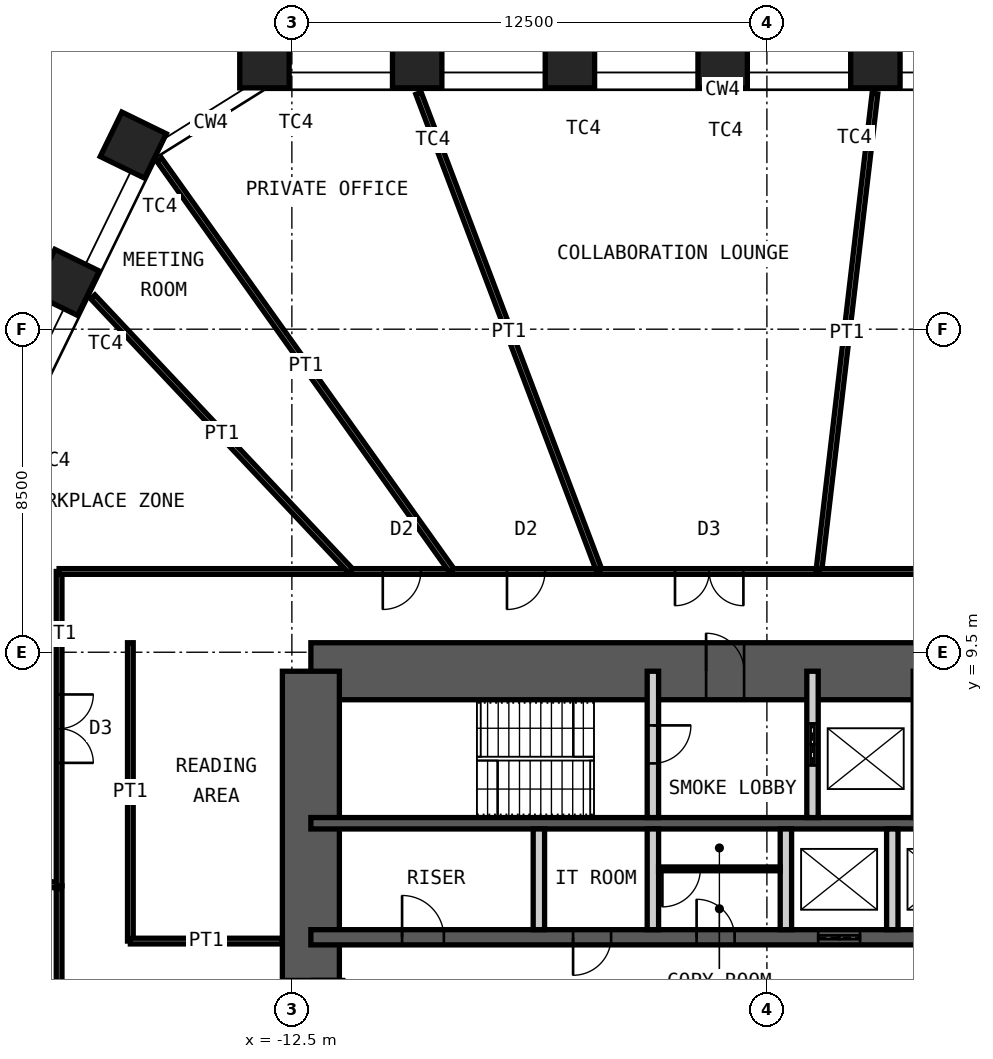
"""IFC4 building model, lengths in metres.
Left out: names, types, materials, properties, quantities, classifications, styles, units other than length and angle.
Written with IfcOpenShell. Run it as: python <this file> out.ifc"""

import sys

from ifc_helpers import new_model, si_unit, direction, frame, frame_2d, origin, origin_2d, place, context, subcontext, project, spatial, rectangle, hollow_rectangle, extrude, element, fill, save


model = new_model("IFC4")
c1 = context("Model", 3, precision=1e-05, world=origin(), true_north=direction((0.0, 1.0)))
c2 = subcontext(c1, "Body", "Model", "MODEL_VIEW")
j1 = project(units=[si_unit("LENGTHUNIT", "METRE"), si_unit("PLANEANGLEUNIT", "RADIAN")], contexts=[c1])
p1 = place(None, origin())
s1 = spatial("IfcSite", under=j1, at=p1, CompositionType="ELEMENT")
p2 = place(p1, origin())
s2 = spatial("IfcBuilding", under=s1, at=p2, CompositionType="ELEMENT")
p3 = place(p2, frame((0.0, 0.0, 157.6)))
s3 = spatial("IfcBuildingStorey", under=s2, at=p3, CompositionType="ELEMENT", Elevation=157.6)
for number, where, z_axis, x_axis in (
    (1, (-13.222, 25.0, 0.0), (0.0, 0.0, 1.0), (-1.0, 0.0, 0.0)),
    (2, (-9.203, 25.0, 0.0), (0.0, 0.0, 1.0), (-1.0, 0.0, 0.0)),
    (3, (-5.184, 25.0, 0.0), (0.0, 0.0, 1.0), (-1.0, 0.0, 0.0)),
    (4, (-1.165, 25.0, 0.0), (0.0, 0.0, 1.0), (-1.0, 0.0, 0.0)),
    (5, (2.854, 25.0, 0.0), (0.0, 0.0, 1.0), (-1.0, 0.0, 0.0)),
    (6, (-18.436, 19.23, 0.0), (0.0, 0.0, 1.0), (-0.438, -0.899, 0.0)),
    (7, (-16.674, 22.843, 0.0), (0.0, 0.0, 1.0), (-0.438, -0.899, 0.0)),
):
    element("IfcColumn", number, at=place(p3, frame(where, z_axis=z_axis, x_axis=x_axis)), inside=s3, PredefinedType="COLUMN", context=c2, shape_type="SweptSolid", body=[
        extrude(hollow_rectangle(XDim=1.3, YDim=1.3, WallThickness=0.1, at=origin_2d()), origin(), (0.0, 0.0, 1.0), 4.2),
    ])
p4 = place(p3, frame((-12.0, 9.0, 0.0), z_axis=(0.0, 0.0, 1.0), x_axis=(1.0, 0.0, 0.0)))
e8 = element("IfcWall", 8, at=p4, inside=s3, PredefinedType="SHEAR", context=c2, shape_type="SweptSolid", body=[
    extrude(rectangle(XDim=24.0, YDim=1.5, at=frame_2d((12.0, 0.0))), origin(), (0.0, 0.0, 1.0), 4.2),
])
p5 = place(p4, frame((10.4, 0.0, 0.0)))
e9 = element("IfcOpeningElement", 9, at=p5, cuts=e8, PredefinedType="OPENING", context=c2, shape_type="SweptSolid", body=[
    extrude(rectangle(XDim=1.0, YDim=2.1, at=frame_2d((0.5, 1.05))), frame((0.0, 0.76, 0.0), z_axis=(0.0, -1.0, 0.0), x_axis=(1.0, 0.0, 0.0)), (0.0, 0.0, 1.0), 1.52),
])
p6 = place(p4, frame((17.6, 0.0, 0.0)))
e10 = element("IfcOpeningElement", 10, at=p6, cuts=e8, PredefinedType="OPENING", context=c2, shape_type="SweptSolid", body=[
    extrude(rectangle(XDim=0.9, YDim=2.1, at=frame_2d((0.45, 1.05))), frame((0.0, 0.76, 0.0), z_axis=(0.0, -1.0, 0.0), x_axis=(1.0, 0.0, 0.0)), (0.0, 0.0, 1.0), 1.52),
])
p7 = place(p4, frame((21.9, 0.0, 0.0)))
e11 = element("IfcOpeningElement", 11, at=p7, cuts=e8, PredefinedType="OPENING", context=c2, shape_type="SweptSolid", body=[
    extrude(rectangle(XDim=0.9, YDim=2.1, at=frame_2d((0.45, 1.05))), frame((0.0, 0.76, 0.0), z_axis=(0.0, -1.0, 0.0), x_axis=(1.0, 0.0, 0.0)), (0.0, 0.0, 1.0), 1.52),
])
p8 = place(p3, frame((-12.0, -9.0, 0.0), z_axis=(0.0, 0.0, 1.0), x_axis=(0.0, 1.0, 0.0)))
e12 = element("IfcWall", 12, at=p8, inside=s3, PredefinedType="SHEAR", context=c2, shape_type="SweptSolid", body=[
    extrude(rectangle(XDim=18.0, YDim=1.5, at=frame_2d((9.0, 0.0))), origin(), (0.0, 0.0, 1.0), 4.2),
])
p9 = place(p8, frame((8.1, 0.0, 0.0)))
e13 = element("IfcOpeningElement", 13, at=p9, cuts=e12, PredefinedType="OPENING", context=c2, shape_type="SweptSolid", body=[
    extrude(rectangle(XDim=1.8, YDim=2.1, at=frame_2d((0.9, 1.05))), frame((0.0, 0.76, 0.0), z_axis=(0.0, -1.0, 0.0), x_axis=(1.0, 0.0, 0.0)), (0.0, 0.0, 1.0), 1.52),
])
p10 = place(p3, frame((-12.0, 5.0, 0.0), z_axis=(0.0, 0.0, 1.0), x_axis=(1.0, 0.0, 0.0)))
e14 = element("IfcWall", 14, at=p10, inside=s3, PredefinedType="SHEAR", context=c2, shape_type="SweptSolid", body=[
    extrude(rectangle(XDim=24.0, YDim=0.3, at=frame_2d((12.0, 0.0))), origin(), (0.0, 0.0, 1.0), 4.2),
])
p11 = place(p3, frame((-12.0, 2.0, 0.0), z_axis=(0.0, 0.0, 1.0), x_axis=(1.0, 0.0, 0.0)))
e15 = element("IfcWall", 15, at=p11, inside=s3, PredefinedType="SHEAR", context=c2, shape_type="SweptSolid", body=[
    extrude(rectangle(XDim=24.0, YDim=0.4, at=frame_2d((12.0, 0.0))), origin(), (0.0, 0.0, 1.0), 4.2),
])
p12 = place(p11, frame((2.4, 0.0, 0.0)))
e16 = element("IfcOpeningElement", 16, at=p12, cuts=e15, PredefinedType="OPENING", context=c2, shape_type="SweptSolid", body=[
    extrude(rectangle(XDim=1.1, YDim=2.1, at=frame_2d((0.55, 1.05))), frame((0.0, 0.21, 0.0), z_axis=(0.0, -1.0, 0.0), x_axis=(1.0, 0.0, 0.0)), (0.0, 0.0, 1.0), 0.42),
])
p13 = place(p11, frame((22.0, 0.0, 0.0)))
e17 = element("IfcOpeningElement", 17, at=p13, cuts=e15, PredefinedType="OPENING", context=c2, shape_type="SweptSolid", body=[
    extrude(rectangle(XDim=1.1, YDim=2.1, at=frame_2d((0.55, 1.05))), frame((0.0, 0.21, 0.0), z_axis=(0.0, -1.0, 0.0), x_axis=(1.0, 0.0, 0.0)), (0.0, 0.0, 1.0), 0.42),
])
p14 = place(p11, frame((10.15, 0.0, 0.0)))
e18 = element("IfcOpeningElement", 18, at=p14, cuts=e15, PredefinedType="OPENING", context=c2, shape_type="SweptSolid", body=[
    extrude(rectangle(XDim=1.0, YDim=2.1, at=frame_2d((0.5, 1.05))), frame((0.0, 0.21, 0.0), z_axis=(0.0, -1.0, 0.0), x_axis=(1.0, 0.0, 0.0)), (0.0, 0.0, 1.0), 0.42),
])
p15 = place(p11, frame((6.9, 0.0, 0.0)))
e19 = element("IfcOpeningElement", 19, at=p15, cuts=e15, PredefinedType="OPENING", context=c2, shape_type="SweptSolid", body=[
    extrude(rectangle(XDim=1.0, YDim=2.1, at=frame_2d((0.5, 1.05))), frame((0.0, 0.21, 0.0), z_axis=(0.0, -1.0, 0.0), x_axis=(1.0, 0.0, 0.0)), (0.0, 0.0, 1.0), 0.42),
])
p16 = place(p11, frame((13.35, 0.0, 0.0)))
e20 = element("IfcOpeningElement", 20, at=p16, cuts=e15, PredefinedType="OPENING", context=c2, shape_type="SweptSolid", body=[
    extrude(rectangle(XDim=1.1, YDim=2.4, at=frame_2d((0.55, 1.2))), frame((0.0, 0.21, 0.0), z_axis=(0.0, -1.0, 0.0), x_axis=(1.0, 0.0, 0.0)), (0.0, 0.0, 1.0), 0.42),
])
p17 = place(p11, frame((16.15, 0.0, 0.0)))
e21 = element("IfcOpeningElement", 21, at=p17, cuts=e15, PredefinedType="OPENING", context=c2, shape_type="SweptSolid", body=[
    extrude(rectangle(XDim=1.1, YDim=2.4, at=frame_2d((0.55, 1.2))), frame((0.0, 0.21, 0.0), z_axis=(0.0, -1.0, 0.0), x_axis=(1.0, 0.0, 0.0)), (0.0, 0.0, 1.0), 0.42),
])
p18 = place(p11, frame((18.95, 0.0, 0.0)))
e22 = element("IfcOpeningElement", 22, at=p18, cuts=e15, PredefinedType="OPENING", context=c2, shape_type="SweptSolid", body=[
    extrude(rectangle(XDim=1.1, YDim=2.4, at=frame_2d((0.55, 1.2))), frame((0.0, 0.21, 0.0), z_axis=(0.0, -1.0, 0.0), x_axis=(1.0, 0.0, 0.0)), (0.0, 0.0, 1.0), 0.42),
])
p19 = place(p3, frame((-3.0, 5.15, 0.0), z_axis=(0.0, 0.0, 1.0), x_axis=(0.0, 1.0, 0.0)))
e23 = element("IfcWall", 23, at=p19, inside=s3, PredefinedType="PARTITIONING", context=c2, shape_type="SweptSolid", body=[
    extrude(rectangle(XDim=3.85, YDim=0.3, at=frame_2d((1.925, 0.0))), origin(), (0.0, 0.0, 1.0), 3.98),
])
p20 = place(p19, frame((1.425, 0.0, 0.0)))
e24 = element("IfcOpeningElement", 24, at=p20, cuts=e23, PredefinedType="OPENING", context=c2, shape_type="SweptSolid", body=[
    extrude(rectangle(XDim=1.0, YDim=2.1, at=frame_2d((0.5, 1.05))), frame((0.0, 0.16, 0.0), z_axis=(0.0, -1.0, 0.0), x_axis=(1.0, 0.0, 0.0)), (0.0, 0.0, 1.0), 0.32),
])
p21 = place(p3, frame((1.2, 5.15, 0.0), z_axis=(0.0, 0.0, 1.0), x_axis=(0.0, 1.0, 0.0)))
e25 = element("IfcWall", 25, at=p21, inside=s3, PredefinedType="PARTITIONING", context=c2, shape_type="SweptSolid", body=[
    extrude(rectangle(XDim=3.85, YDim=0.3, at=frame_2d((1.925, 0.0))), origin(), (0.0, 0.0, 1.0), 3.98),
])
p22 = place(p21, frame((1.375, 0.0, 0.0)))
e26 = element("IfcOpeningElement", 26, at=p22, cuts=e25, PredefinedType="OPENING", context=c2, shape_type="SweptSolid", body=[
    extrude(rectangle(XDim=1.1, YDim=2.4, at=frame_2d((0.55, 1.2))), frame((0.0, 0.16, 0.0), z_axis=(0.0, -1.0, 0.0), x_axis=(1.0, 0.0, 0.0)), (0.0, 0.0, 1.0), 0.32),
])
p23 = place(p3, frame((4.0, 5.15, 0.0), z_axis=(0.0, 0.0, 1.0), x_axis=(0.0, 1.0, 0.0)))
e27 = element("IfcWall", 27, at=p23, inside=s3, PredefinedType="PARTITIONING", context=c2, shape_type="SweptSolid", body=[
    extrude(rectangle(XDim=3.85, YDim=0.3, at=frame_2d((1.925, 0.0))), origin(), (0.0, 0.0, 1.0), 3.98),
])
for number, where, z_axis, x_axis in (
    (28, (-6.0, 2.2, 0.0), (0.0, 0.0, 1.0), (0.0, 1.0, 0.0)),
    (29, (-3.0, 2.2, 0.0), (0.0, 0.0, 1.0), (0.0, 1.0, 0.0)),
    (30, (0.5, 2.2, 0.0), (0.0, 0.0, 1.0), (0.0, 1.0, 0.0)),
    (31, (3.3, 2.2, 0.0), (0.0, 0.0, 1.0), (0.0, 1.0, 0.0)),
):
    element("IfcWall", number, at=place(p3, frame(where, z_axis=z_axis, x_axis=x_axis)), inside=s3, PredefinedType="PARTITIONING", context=c2, shape_type="SweptSolid", body=[
        extrude(rectangle(XDim=2.65, YDim=0.3, at=frame_2d((1.325, 0.0))), origin(), (0.0, 0.0, 1.0), 3.98),
    ])
p24 = place(p3, frame((-2.85, 3.8, 0.0), z_axis=(0.0, 0.0, 1.0), x_axis=(1.0, 0.0, 0.0)))
e32 = element("IfcWall", 32, at=p24, inside=s3, PredefinedType="PARTITIONING", context=c2, shape_type="SweptSolid", body=[
    extrude(rectangle(XDim=3.2, YDim=0.1, at=frame_2d((1.6, 0.0))), origin(), (0.0, 0.0, 1.0), 3.98),
])
p25 = place(p24, frame((0.1, 0.0, 0.0)))
e33 = element("IfcOpeningElement", 33, at=p25, cuts=e32, PredefinedType="OPENING", context=c2, shape_type="SweptSolid", body=[
    extrude(rectangle(XDim=1.0, YDim=2.4, at=frame_2d((0.5, 1.2))), frame((0.0, 0.06, 0.0), z_axis=(0.0, -1.0, 0.0), x_axis=(1.0, 0.0, 0.0)), (0.0, 0.0, 1.0), 0.12),
])
p26 = place(p3, frame((-18.625, -4.715, 0.0), z_axis=(0.0, 0.0, 1.0), x_axis=(0.0, 1.0, 0.0)))
e34 = element("IfcWall", 34, at=p26, inside=s3, PredefinedType="PARTITIONING", context=c2, shape_type="SweptSolid", body=[
    extrude(rectangle(XDim=8.068, YDim=0.15, at=frame_2d((4.034, 0.0))), origin(), (0.0, 0.0, 1.0), 4.03),
])
p27 = place(p26, frame((3.534, 0.0, 0.0)))
e35 = element("IfcOpeningElement", 35, at=p27, cuts=e34, PredefinedType="OPENING", context=c2, shape_type="SweptSolid", body=[
    extrude(rectangle(XDim=1.0, YDim=2.4, at=frame_2d((0.5, 1.2))), frame((0.0, 0.085, 0.0), z_axis=(0.0, -1.0, 0.0), x_axis=(1.0, 0.0, 0.0)), (0.0, 0.0, 1.0), 0.17),
])
p28 = place(p3, frame((-24.755, 4.457, 0.0), z_axis=(0.0, 0.0, 1.0), x_axis=(0.984175122587, -0.177198555524, 0.0)))
e36 = element("IfcWall", 36, at=p28, inside=s3, PredefinedType="PARTITIONING", context=c2, shape_type="SweptSolid", body=[
    extrude(rectangle(XDim=6.229, YDim=0.15, at=frame_2d((3.115, 0.0))), origin(), (0.0, 0.0, 1.0), 3.33),
])
p29 = place(p3, frame((-18.625, 3.353, 0.0), z_axis=(0.0, 0.0, 1.0), x_axis=(0.0, 1.0, 0.0)))
e37 = element("IfcWall", 37, at=p29, inside=s3, PredefinedType="PARTITIONING", context=c2, shape_type="SweptSolid", body=[
    extrude(rectangle(XDim=8.272, YDim=0.15, at=frame_2d((4.136, 0.0))), origin(), (0.0, 0.0, 1.0), 4.03),
])
p30 = place(p29, frame((3.236, 0.0, 0.0)))
e38 = element("IfcOpeningElement", 38, at=p30, cuts=e37, PredefinedType="OPENING", context=c2, shape_type="SweptSolid", body=[
    extrude(rectangle(XDim=1.8, YDim=2.4, at=frame_2d((0.9, 1.2))), frame((0.0, 0.085, 0.0), z_axis=(0.0, -1.0, 0.0), x_axis=(1.0, 0.0, 0.0)), (0.0, 0.0, 1.0), 0.17),
])
p31 = place(p3, frame((-18.625, 11.625, 0.0), z_axis=(0.0, 0.0, 1.0), x_axis=(1.0, 0.0, 0.0)))
e39 = element("IfcWall", 39, at=p31, inside=s3, PredefinedType="PARTITIONING", context=c2, shape_type="SweptSolid", body=[
    extrude(rectangle(XDim=7.686, YDim=0.15, at=frame_2d((3.843, 0.0))), origin(), (0.0, 0.0, 1.0), 4.03),
])
p32 = place(p3, frame((-17.738, 18.851, 0.0), z_axis=(0.0, 0.0, 1.0), x_axis=(0.685286406267, -0.728273672039, 0.0)))
e40 = element("IfcWall", 40, at=p32, inside=s3, PredefinedType="PARTITIONING", context=c2, shape_type="SweptSolid", body=[
    extrude(rectangle(XDim=9.922, YDim=0.15, at=frame_2d((4.961, 0.0))), origin(), (0.0, 0.0, 1.0), 3.33),
])
p33 = place(p3, frame((-10.939, 11.625, 0.0), z_axis=(0.0, 0.0, 1.0), x_axis=(1.0, 0.0, 0.0)))
e41 = element("IfcWall", 41, at=p33, inside=s3, PredefinedType="PARTITIONING", context=c2, shape_type="SweptSolid", body=[
    extrude(rectangle(XDim=2.662, YDim=0.15, at=frame_2d((1.331, 0.0))), origin(), (0.0, 0.0, 1.0), 4.03),
])
p34 = place(p33, frame((0.831, 0.0, 0.0)))
e42 = element("IfcOpeningElement", 42, at=p34, cuts=e41, PredefinedType="OPENING", context=c2, shape_type="SweptSolid", body=[
    extrude(rectangle(XDim=1.0, YDim=2.4, at=frame_2d((0.5, 1.2))), frame((0.0, 0.085, 0.0), z_axis=(0.0, -1.0, 0.0), x_axis=(1.0, 0.0, 0.0)), (0.0, 0.0, 1.0), 0.17),
])
p35 = place(p3, frame((-15.987, 22.455, 0.0), z_axis=(0.0, 0.0, 1.0), x_axis=(0.579969304452, -0.814638328274, 0.0)))
e43 = element("IfcWall", 43, at=p35, inside=s3, PredefinedType="PARTITIONING", context=c2, shape_type="SweptSolid", body=[
    extrude(rectangle(XDim=13.294, YDim=0.15, at=frame_2d((6.647, 0.0))), origin(), (0.0, 0.0, 1.0), 2.93),
])
p36 = place(p3, frame((-8.277, 11.625, 0.0), z_axis=(0.0, 0.0, 1.0), x_axis=(1.0, 0.0, 0.0)))
e44 = element("IfcWall", 44, at=p36, inside=s3, PredefinedType="PARTITIONING", context=c2, shape_type="SweptSolid", body=[
    extrude(rectangle(XDim=3.874, YDim=0.15, at=frame_2d((1.937, 0.0))), origin(), (0.0, 0.0, 1.0), 4.03),
])
p37 = place(p36, frame((1.437, 0.0, 0.0)))
e45 = element("IfcOpeningElement", 45, at=p37, cuts=e44, PredefinedType="OPENING", context=c2, shape_type="SweptSolid", body=[
    extrude(rectangle(XDim=1.0, YDim=2.4, at=frame_2d((0.5, 1.2))), frame((0.0, 0.085, 0.0), z_axis=(0.0, -1.0, 0.0), x_axis=(1.0, 0.0, 0.0)), (0.0, 0.0, 1.0), 0.17),
])
p38 = place(p3, frame((-9.167, 24.207, 0.0), z_axis=(0.0, 0.0, 1.0), x_axis=(0.354156368181, -0.935186220427, 0.0)))
e46 = element("IfcWall", 46, at=p38, inside=s3, PredefinedType="PARTITIONING", context=c2, shape_type="SweptSolid", body=[
    extrude(rectangle(XDim=13.454, YDim=0.15, at=frame_2d((6.727, 0.0))), origin(), (0.0, 0.0, 1.0), 3.33),
])
p39 = place(p3, frame((-4.403, 11.625, 0.0), z_axis=(0.0, 0.0, 1.0), x_axis=(1.0, 0.0, 0.0)))
e47 = element("IfcWall", 47, at=p39, inside=s3, PredefinedType="PARTITIONING", context=c2, shape_type="SweptSolid", body=[
    extrude(rectangle(XDim=5.768, YDim=0.15, at=frame_2d((2.884, 0.0))), origin(), (0.0, 0.0, 1.0), 4.03),
])
p40 = place(p39, frame((1.984, 0.0, 0.0)))
e48 = element("IfcOpeningElement", 48, at=p40, cuts=e47, PredefinedType="OPENING", context=c2, shape_type="SweptSolid", body=[
    extrude(rectangle(XDim=1.8, YDim=2.4, at=frame_2d((0.9, 1.2))), frame((0.0, 0.085, 0.0), z_axis=(0.0, -1.0, 0.0), x_axis=(1.0, 0.0, 0.0)), (0.0, 0.0, 1.0), 0.17),
])
p41 = place(p3, frame((2.843, 24.201, 0.0), z_axis=(0.0, 0.0, 1.0), x_axis=(-0.116670084723, -0.993170726175, 0.0)))
e49 = element("IfcWall", 49, at=p41, inside=s3, PredefinedType="PARTITIONING", context=c2, shape_type="SweptSolid", body=[
    extrude(rectangle(XDim=12.662, YDim=0.15, at=frame_2d((6.331, 0.0))), origin(), (0.0, 0.0, 1.0), 3.33),
])
p42 = place(p3, frame((1.366, 11.625, 0.0), z_axis=(0.0, 0.0, 1.0), x_axis=(1.0, 0.0, 0.0)))
e50 = element("IfcWall", 50, at=p42, inside=s3, PredefinedType="PARTITIONING", context=c2, shape_type="SweptSolid", body=[
    extrude(rectangle(XDim=8.46, YDim=0.15, at=frame_2d((4.23, 0.0))), origin(), (0.0, 0.0, 1.0), 4.03),
])
p43 = place(p42, frame((3.33, 0.0, 0.0)))
e51 = element("IfcOpeningElement", 51, at=p43, cuts=e50, PredefinedType="OPENING", context=c2, shape_type="SweptSolid", body=[
    extrude(rectangle(XDim=1.8, YDim=2.4, at=frame_2d((0.9, 1.2))), frame((0.0, 0.085, 0.0), z_axis=(0.0, -1.0, 0.0), x_axis=(1.0, 0.0, 0.0)), (0.0, 0.0, 1.0), 0.17),
])
p44 = place(p3, frame((-16.75, 1.9, 0.0), z_axis=(0.0, 0.0, 1.0), x_axis=(0.0, 1.0, 0.0)))
e52 = element("IfcWall", 52, at=p44, inside=s3, PredefinedType="PARTITIONING", context=c2, shape_type="SweptSolid", body=[
    extrude(rectangle(XDim=7.85, YDim=0.15, at=frame_2d((3.925, 0.0))), origin(), (0.0, 0.0, 1.0), 4.03),
])
p45 = place(p3, frame((-12.75, 1.9, 0.0), z_axis=(0.0, 0.0, 1.0), x_axis=(-1.0, 0.0, 0.0)))
e53 = element("IfcWall", 53, at=p45, inside=s3, PredefinedType="PARTITIONING", context=c2, shape_type="SweptSolid", body=[
    extrude(rectangle(XDim=4.0, YDim=0.15, at=frame_2d((2.0, 0.0))), origin(), (0.0, 0.0, 1.0), 3.33),
])
p46 = place(p5, origin())
e54 = element("IfcDoor", 54, at=p46, inside=s3, OperationType="SINGLE_SWING_RIGHT", PredefinedType="DOOR", context=c2, shape_type="SweptSolid", body=[
    extrude(rectangle(XDim=1.0, YDim=2.1, at=frame_2d((0.5, 1.05))), frame((0.0, 0.025, 0.0), z_axis=(0.0, -1.0, 0.0), x_axis=(1.0, 0.0, 0.0)), (0.0, 0.0, 1.0), 0.05),
])
fill(e9, e54)
p47 = place(p20, origin())
e55 = element("IfcDoor", 55, at=p47, inside=s3, OperationType="SINGLE_SWING_RIGHT", PredefinedType="DOOR", context=c2, shape_type="SweptSolid", body=[
    extrude(rectangle(XDim=1.0, YDim=2.1, at=frame_2d((0.5, 1.05))), frame((0.0, 0.025, 0.0), z_axis=(0.0, -1.0, 0.0), x_axis=(1.0, 0.0, 0.0)), (0.0, 0.0, 1.0), 0.05),
])
fill(e24, e55)
p48 = place(p12, origin())
e56 = element("IfcDoor", 56, at=p48, inside=s3, OperationType="SINGLE_SWING_RIGHT", PredefinedType="DOOR", context=c2, shape_type="SweptSolid", body=[
    extrude(rectangle(XDim=1.1, YDim=2.1, at=frame_2d((0.55, 1.05))), frame((0.0, 0.025, 0.0), z_axis=(0.0, -1.0, 0.0), x_axis=(1.0, 0.0, 0.0)), (0.0, 0.0, 1.0), 0.05),
])
fill(e16, e56)
p49 = place(p14, origin())
e57 = element("IfcDoor", 57, at=p49, inside=s3, OperationType="SINGLE_SWING_RIGHT", PredefinedType="DOOR", context=c2, shape_type="SweptSolid", body=[
    extrude(rectangle(XDim=1.0, YDim=2.1, at=frame_2d((0.5, 1.05))), frame((0.0, 0.025, 0.0), z_axis=(0.0, -1.0, 0.0), x_axis=(1.0, 0.0, 0.0)), (0.0, 0.0, 1.0), 0.05),
])
fill(e18, e57)
p50 = place(p9, origin())
e58 = element("IfcDoor", 58, at=p50, inside=s3, OperationType="DOUBLE_DOOR_DOUBLE_SWING", PredefinedType="DOOR", context=c2, shape_type="SweptSolid", body=[
    extrude(rectangle(XDim=1.8, YDim=2.1, at=frame_2d((0.9, 1.05))), frame((0.0, 0.025, 0.0), z_axis=(0.0, -1.0, 0.0), x_axis=(1.0, 0.0, 0.0)), (0.0, 0.0, 1.0), 0.05),
])
fill(e13, e58)
p51 = place(p22, origin())
e59 = element("IfcDoor", 59, at=p51, inside=s3, OperationType="DOUBLE_DOOR_SLIDING", PredefinedType="DOOR", context=c2, shape_type="SweptSolid", body=[
    extrude(rectangle(XDim=1.1, YDim=2.4, at=frame_2d((0.55, 1.2))), frame((0.0, 0.025, 0.0), z_axis=(0.0, -1.0, 0.0), x_axis=(1.0, 0.0, 0.0)), (0.0, 0.0, 1.0), 0.05),
])
fill(e26, e59)
p52 = place(p15, origin())
e60 = element("IfcDoor", 60, at=p52, inside=s3, OperationType="SINGLE_SWING_LEFT", PredefinedType="DOOR", context=c2, shape_type="SweptSolid", body=[
    extrude(rectangle(XDim=1.0, YDim=2.1, at=frame_2d((0.5, 1.05))), frame((0.0, 0.025, 0.0), z_axis=(0.0, -1.0, 0.0), x_axis=(1.0, 0.0, 0.0)), (0.0, 0.0, 1.0), 0.05),
])
fill(e19, e60)
p53 = place(p16, origin())
e61 = element("IfcDoor", 61, at=p53, inside=s3, OperationType="DOUBLE_DOOR_SLIDING", PredefinedType="DOOR", context=c2, shape_type="SweptSolid", body=[
    extrude(rectangle(XDim=1.1, YDim=2.4, at=frame_2d((0.55, 1.2))), frame((0.0, 0.025, 0.0), z_axis=(0.0, -1.0, 0.0), x_axis=(1.0, 0.0, 0.0)), (0.0, 0.0, 1.0), 0.05),
])
fill(e20, e61)
p54 = place(p25, origin())
e62 = element("IfcDoor", 62, at=p54, inside=s3, OperationType="SINGLE_SWING_LEFT", PredefinedType="DOOR", context=c2, shape_type="SweptSolid", body=[
    extrude(rectangle(XDim=1.0, YDim=2.4, at=frame_2d((0.5, 1.2))), frame((0.0, 0.025, 0.0), z_axis=(0.0, -1.0, 0.0), x_axis=(1.0, 0.0, 0.0)), (0.0, 0.0, 1.0), 0.05),
])
fill(e33, e62)
p55 = place(p30, origin())
e63 = element("IfcDoor", 63, at=p55, inside=s3, OperationType="DOUBLE_DOOR_DOUBLE_SWING", PredefinedType="DOOR", context=c2, shape_type="SweptSolid", body=[
    extrude(rectangle(XDim=1.8, YDim=2.4, at=frame_2d((0.9, 1.2))), frame((0.0, 0.025, 0.0), z_axis=(0.0, -1.0, 0.0), x_axis=(1.0, 0.0, 0.0)), (0.0, 0.0, 1.0), 0.05),
])
fill(e38, e63)
p56 = place(p34, origin())
e64 = element("IfcDoor", 64, at=p56, inside=s3, OperationType="SINGLE_SWING_LEFT", PredefinedType="DOOR", context=c2, shape_type="SweptSolid", body=[
    extrude(rectangle(XDim=1.0, YDim=2.4, at=frame_2d((0.5, 1.2))), frame((0.0, 0.025, 0.0), z_axis=(0.0, -1.0, 0.0), x_axis=(1.0, 0.0, 0.0)), (0.0, 0.0, 1.0), 0.05),
])
fill(e42, e64)
p57 = place(p37, origin())
e65 = element("IfcDoor", 65, at=p57, inside=s3, OperationType="SINGLE_SWING_LEFT", PredefinedType="DOOR", context=c2, shape_type="SweptSolid", body=[
    extrude(rectangle(XDim=1.0, YDim=2.4, at=frame_2d((0.5, 1.2))), frame((0.0, 0.025, 0.0), z_axis=(0.0, -1.0, 0.0), x_axis=(1.0, 0.0, 0.0)), (0.0, 0.0, 1.0), 0.05),
])
fill(e45, e65)
p58 = place(p40, origin())
e66 = element("IfcDoor", 66, at=p58, inside=s3, OperationType="DOUBLE_DOOR_DOUBLE_SWING", PredefinedType="DOOR", context=c2, shape_type="SweptSolid", body=[
    extrude(rectangle(XDim=1.8, YDim=2.4, at=frame_2d((0.9, 1.2))), frame((0.0, 0.025, 0.0), z_axis=(0.0, -1.0, 0.0), x_axis=(1.0, 0.0, 0.0)), (0.0, 0.0, 1.0), 0.05),
])
fill(e48, e66)
save(model, sys.argv[1])
